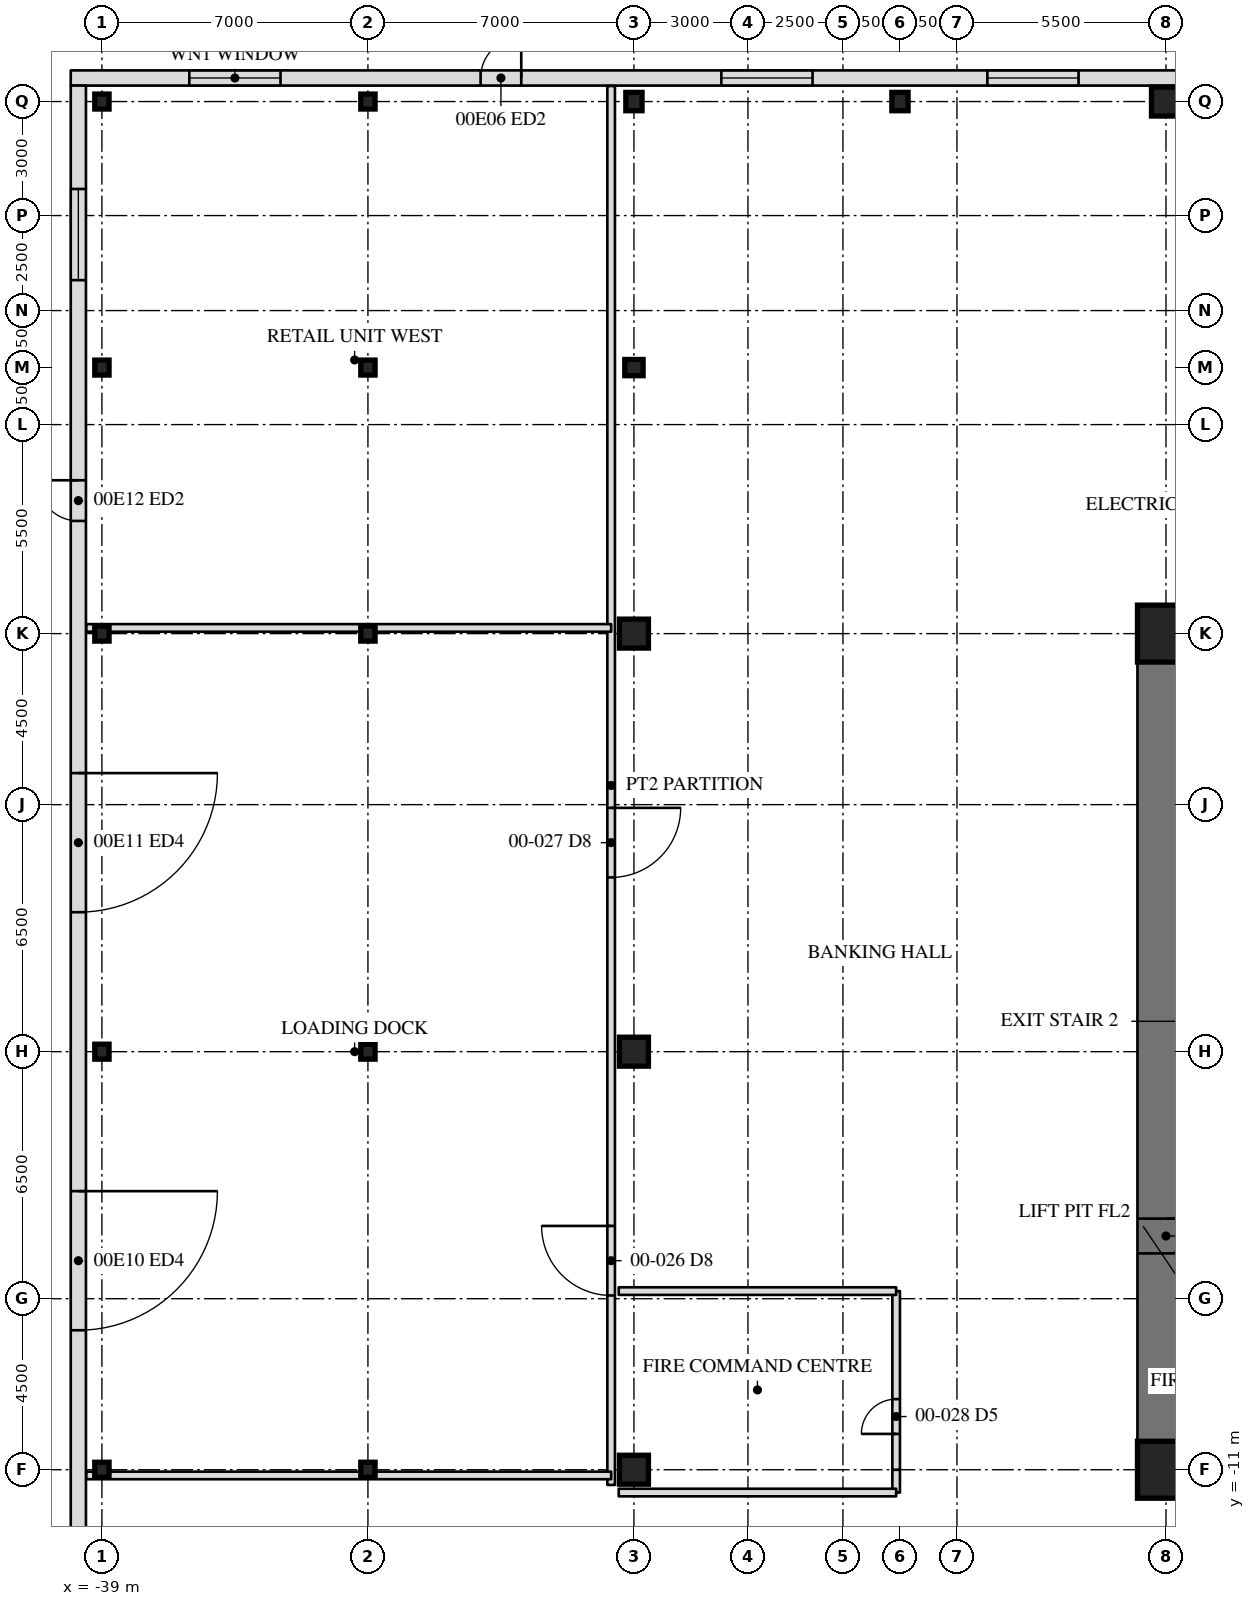
"""IFC4 building model, lengths in metres.
Left out: names, types, materials, properties, quantities, classifications, styles, units other than length and angle.
Written with IfcOpenShell. Run it as: python <this file> out.ifc"""

import sys

from ifc_helpers import new_model, si_unit, direction, frame, frame_2d, origin, origin_2d, place, context, subcontext, project, spatial, rectangle, hollow_rectangle, i_section, extrude, element, fill, save


model = new_model("IFC4")
c1 = context("Model", 3, precision=1e-05, world=origin(), true_north=direction((0.0, 1.0)))
c2 = subcontext(c1, "Body", "Model", "MODEL_VIEW")
j1 = project(units=[si_unit("LENGTHUNIT", "METRE"), si_unit("PLANEANGLEUNIT", "RADIAN")], contexts=[c1])
p1 = place(None, origin())
s1 = spatial("IfcSite", under=j1, at=p1, CompositionType="ELEMENT")
p2 = place(p1, origin())
s2 = spatial("IfcBuilding", under=s1, at=p2, CompositionType="ELEMENT")
p3 = place(p2, origin())
s3 = spatial("IfcBuildingStorey", under=s2, at=p3, CompositionType="ELEMENT", Elevation=0.0)
for number, where, z_axis, x_axis in (
    (1, (-25.0, 0.0, -0.3), (0.0, 0.0, 1.0), (0.0, 1.0, 0.0)),
    (2, (-25.0, -11.0, -0.3), (0.0, 0.0, 1.0), (0.0, 1.0, 0.0)),
    (3, (-11.0, 25.0, -0.3), (0.0, 0.0, 1.0), (1.0, 0.0, 0.0)),
):
    element("IfcColumn", number, at=place(p3, frame(where, z_axis=z_axis, x_axis=x_axis)), inside=s3, PredefinedType="COLUMN", context=c2, shape_type="SweptSolid", body=[
        extrude(hollow_rectangle(XDim=0.762, YDim=0.762, WallThickness=0.152, at=origin_2d()), origin(), (0.0, 0.0, 1.0), 6.3),
    ])
for number, where, z_axis, x_axis in (
    (4, (-18.0, 25.0, -0.3), (0.0, 0.0, 1.0), (1.0, 0.0, 0.0)),
    (5, (-25.0, 25.0, -0.3), (0.0, 0.0, 1.0), (1.0, 0.0, 0.0)),
    (6, (-25.0, 18.0, -0.3), (0.0, 0.0, 1.0), (0.0, 1.0, 0.0)),
):
    element("IfcColumn", number, at=place(p3, frame(where, z_axis=z_axis, x_axis=x_axis)), inside=s3, PredefinedType="COLUMN", context=c2, shape_type="SweptSolid", body=[
        extrude(i_section(OverallWidth=0.427, OverallDepth=0.483, WebThickness=0.051, FlangeThickness=0.082, at=origin_2d()), origin(), (0.0, 0.0, 1.0), 6.3),
    ])
p4 = place(p3, frame((-25.0, 11.0, -0.3), z_axis=(0.0, 0.0, 1.0), x_axis=(0.0, 1.0, 0.0)))
e7 = element("IfcColumn", 7, at=p4, inside=s3, PredefinedType="COLUMN", context=c2, shape_type="SweptSolid", body=[
    extrude(hollow_rectangle(XDim=0.762, YDim=0.762, WallThickness=0.152, at=origin_2d()), origin(), (0.0, 0.0, 1.0), 6.3),
])
for number, where, z_axis, x_axis in (
    (8, (-39.0, -11.0, -0.3), (0.0, 0.0, 1.0), (0.0, 1.0, 0.0)),
    (9, (-39.0, 0.0, -0.3), (0.0, 0.0, 1.0), (0.0, 1.0, 0.0)),
    (10, (-39.0, 11.0, -0.3), (0.0, 0.0, 1.0), (0.0, 1.0, 0.0)),
    (11, (-39.0, 18.0, -0.3), (0.0, 0.0, 1.0), (0.0, 1.0, 0.0)),
    (12, (-39.0, 25.0, -0.3), (0.0, 0.0, 1.0), (0.0, 1.0, 0.0)),
    (13, (-32.0, -11.0, -0.3), (0.0, 0.0, 1.0), (0.0, 1.0, 0.0)),
    (14, (-32.0, 0.0, -0.3), (0.0, 0.0, 1.0), (0.0, 1.0, 0.0)),
    (15, (-32.0, 11.0, -0.3), (0.0, 0.0, 1.0), (0.0, 1.0, 0.0)),
    (16, (-32.0, 18.0, -0.3), (0.0, 0.0, 1.0), (0.0, 1.0, 0.0)),
    (17, (-32.0, 25.0, -0.3), (0.0, 0.0, 1.0), (0.0, 1.0, 0.0)),
):
    element("IfcColumn", number, at=place(p3, frame(where, z_axis=z_axis, x_axis=x_axis)), inside=s3, PredefinedType="COLUMN", context=c2, shape_type="SweptSolid", body=[
        extrude(i_section(OverallWidth=0.394, OverallDepth=0.376, WebThickness=0.017, FlangeThickness=0.028, at=origin_2d()), origin(), (0.0, 0.0, 1.0), 6.3),
    ])
p5 = place(p3, frame((-11.0, 11.0, -0.3), z_axis=(0.0, 0.0, 1.0), x_axis=(0.0, -1.0, 0.0)))
e18 = element("IfcWall", 18, at=p5, inside=s3, PredefinedType="SHEAR", context=c2, shape_type="SweptSolid", body=[
    extrude(rectangle(XDim=22.0, YDim=1.5, at=frame_2d((11.0, 0.0))), origin(), (0.0, 0.0, 1.0), 6.3),
])
p6 = place(p5, frame((15.393, 0.0, 0.3)))
e19 = element("IfcOpeningElement", 19, at=p6, cuts=e18, PredefinedType="OPENING", context=c2, shape_type="SweptSolid", body=[
    extrude(rectangle(XDim=0.915, YDim=2.134, at=frame_2d((0.458, 1.067))), frame((0.0, 0.76, 0.0), z_axis=(0.0, -1.0, 0.0), x_axis=(1.0, 0.0, 0.0)), (0.0, 0.0, 1.0), 1.52),
])
for number, where, z_axis, x_axis in (
    (20, (-6.5, 11.0, -0.3), (0.0, 0.0, 1.0), (-1.0, 0.0, 0.0)),
    (21, (-11.0, -11.0, -0.3), (0.0, 0.0, 1.0), (1.0, 0.0, 0.0)),
):
    element("IfcWall", number, at=place(p3, frame(where, z_axis=z_axis, x_axis=x_axis)), inside=s3, PredefinedType="SHEAR", context=c2, shape_type="SweptSolid", body=[
        extrude(rectangle(XDim=4.5, YDim=1.5, at=frame_2d((2.25, 0.0))), origin(), (0.0, 0.0, 1.0), 6.3),
    ])
for number, where, z_axis, x_axis in (
    (22, (-11.0, 11.0, -0.3), (0.0, 0.0, 1.0), (1.0, 0.0, 0.0)),
    (23, (-11.0, -11.0, -0.3), (0.0, 0.0, 1.0), (1.0, 0.0, 0.0)),
):
    element("IfcColumn", number, at=place(p3, frame(where, z_axis=z_axis, x_axis=x_axis)), inside=s3, PredefinedType="COLUMN", context=c2, shape_type="SweptSolid", body=[
        extrude(hollow_rectangle(XDim=1.499, YDim=1.499, WallThickness=0.102, at=origin_2d()), origin(), (0.0, 0.0, 1.0), 6.3),
    ])
p7 = place(p3, frame((39.82, 25.62, -0.3), z_axis=(0.0, 0.0, 1.0), x_axis=(-1.0, 0.0, 0.0)))
e24 = element("IfcWall", 24, at=p7, inside=s3, PredefinedType="SOLIDWALL", context=c2, shape_type="SweptSolid", body=[
    extrude(rectangle(XDim=79.64, YDim=0.4, at=frame_2d((39.82, 0.0))), origin(), (0.0, 0.0, 1.0), 6.11),
])
p8 = place(p7, frame((74.12, 0.0, 1.2)))
e25 = element("IfcOpeningElement", 25, at=p8, cuts=e24, PredefinedType="OPENING", context=c2, shape_type="SweptSolid", body=[
    extrude(rectangle(XDim=2.4, YDim=4.2, at=frame_2d((1.2, 2.1))), frame((0.0, 0.21, 0.0), z_axis=(0.0, -1.0, 0.0), x_axis=(1.0, 0.0, 0.0)), (0.0, 0.0, 1.0), 0.42),
])
p9 = place(p7, frame((67.785, 0.0, 0.3)))
e26 = element("IfcOpeningElement", 26, at=p9, cuts=e24, PredefinedType="OPENING", context=c2, shape_type="SweptSolid", body=[
    extrude(rectangle(XDim=1.07, YDim=2.44, at=frame_2d((0.535, 1.22))), frame((0.0, 0.21, 0.0), z_axis=(0.0, -1.0, 0.0), x_axis=(1.0, 0.0, 0.0)), (0.0, 0.0, 1.0), 0.42),
])
p10 = place(p7, frame((60.12, 0.0, 1.2)))
e27 = element("IfcOpeningElement", 27, at=p10, cuts=e24, PredefinedType="OPENING", context=c2, shape_type="SweptSolid", body=[
    extrude(rectangle(XDim=2.4, YDim=4.2, at=frame_2d((1.2, 2.1))), frame((0.0, 0.21, 0.0), z_axis=(0.0, -1.0, 0.0), x_axis=(1.0, 0.0, 0.0)), (0.0, 0.0, 1.0), 0.42),
])
p11 = place(p7, frame((53.12, 0.0, 1.2)))
e28 = element("IfcOpeningElement", 28, at=p11, cuts=e24, PredefinedType="OPENING", context=c2, shape_type="SweptSolid", body=[
    extrude(rectangle(XDim=2.4, YDim=4.2, at=frame_2d((1.2, 2.1))), frame((0.0, 0.21, 0.0), z_axis=(0.0, -1.0, 0.0), x_axis=(1.0, 0.0, 0.0)), (0.0, 0.0, 1.0), 0.42),
])
p12 = place(p7, frame((44.405, 0.0, 0.3)))
e29 = element("IfcOpeningElement", 29, at=p12, cuts=e24, PredefinedType="OPENING", context=c2, shape_type="SweptSolid", body=[
    extrude(rectangle(XDim=1.83, YDim=2.44, at=frame_2d((0.915, 1.22))), frame((0.0, 0.21, 0.0), z_axis=(0.0, -1.0, 0.0), x_axis=(1.0, 0.0, 0.0)), (0.0, 0.0, 1.0), 0.42),
])
p13 = place(p7, frame((33.405, 0.0, 0.3)))
e30 = element("IfcOpeningElement", 30, at=p13, cuts=e24, PredefinedType="OPENING", context=c2, shape_type="SweptSolid", body=[
    extrude(rectangle(XDim=1.83, YDim=2.44, at=frame_2d((0.915, 1.22))), frame((0.0, 0.21, 0.0), z_axis=(0.0, -1.0, 0.0), x_axis=(1.0, 0.0, 0.0)), (0.0, 0.0, 1.0), 0.42),
])
p14 = place(p7, frame((24.12, 0.0, 1.2)))
e31 = element("IfcOpeningElement", 31, at=p14, cuts=e24, PredefinedType="OPENING", context=c2, shape_type="SweptSolid", body=[
    extrude(rectangle(XDim=2.4, YDim=4.2, at=frame_2d((1.2, 2.1))), frame((0.0, 0.21, 0.0), z_axis=(0.0, -1.0, 0.0), x_axis=(1.0, 0.0, 0.0)), (0.0, 0.0, 1.0), 0.42),
])
p15 = place(p7, frame((17.12, 0.0, 1.2)))
e32 = element("IfcOpeningElement", 32, at=p15, cuts=e24, PredefinedType="OPENING", context=c2, shape_type="SweptSolid", body=[
    extrude(rectangle(XDim=2.4, YDim=4.2, at=frame_2d((1.2, 2.1))), frame((0.0, 0.21, 0.0), z_axis=(0.0, -1.0, 0.0), x_axis=(1.0, 0.0, 0.0)), (0.0, 0.0, 1.0), 0.42),
])
p16 = place(p7, frame((3.12, 0.0, 1.2)))
e33 = element("IfcOpeningElement", 33, at=p16, cuts=e24, PredefinedType="OPENING", context=c2, shape_type="SweptSolid", body=[
    extrude(rectangle(XDim=2.4, YDim=4.2, at=frame_2d((1.2, 2.1))), frame((0.0, 0.21, 0.0), z_axis=(0.0, -1.0, 0.0), x_axis=(1.0, 0.0, 0.0)), (0.0, 0.0, 1.0), 0.42),
])
p17 = place(p7, frame((10.785, 0.0, 0.3)))
e34 = element("IfcOpeningElement", 34, at=p17, cuts=e24, PredefinedType="OPENING", context=c2, shape_type="SweptSolid", body=[
    extrude(rectangle(XDim=1.07, YDim=2.13, at=frame_2d((0.535, 1.065))), frame((0.0, 0.21, 0.0), z_axis=(0.0, -1.0, 0.0), x_axis=(1.0, 0.0, 0.0)), (0.0, 0.0, 1.0), 0.42),
])
p18 = place(p3, frame((-39.62, 25.42, -0.3), z_axis=(0.0, 0.0, 1.0), x_axis=(0.0, -1.0, 0.0)))
e35 = element("IfcWall", 35, at=p18, inside=s3, PredefinedType="SOLIDWALL", context=c2, shape_type="SweptSolid", body=[
    extrude(rectangle(XDim=50.84, YDim=0.4, at=frame_2d((25.42, 0.0))), origin(), (0.0, 0.0, 1.0), 6.11),
])
p19 = place(p18, frame((45.72, 0.0, 1.2)))
e36 = element("IfcOpeningElement", 36, at=p19, cuts=e35, PredefinedType="OPENING", context=c2, shape_type="SweptSolid", body=[
    extrude(rectangle(XDim=2.4, YDim=4.2, at=frame_2d((1.2, 2.1))), frame((0.0, 0.21, 0.0), z_axis=(0.0, -1.0, 0.0), x_axis=(1.0, 0.0, 0.0)), (0.0, 0.0, 1.0), 0.42),
])
p20 = place(p18, frame((39.385, 0.0, 0.3)))
e37 = element("IfcOpeningElement", 37, at=p20, cuts=e35, PredefinedType="OPENING", context=c2, shape_type="SweptSolid", body=[
    extrude(rectangle(XDim=1.07, YDim=2.13, at=frame_2d((0.535, 1.065))), frame((0.0, 0.21, 0.0), z_axis=(0.0, -1.0, 0.0), x_axis=(1.0, 0.0, 0.0)), (0.0, 0.0, 1.0), 0.42),
])
p21 = place(p18, frame((29.09, 0.0, 0.3)))
e38 = element("IfcOpeningElement", 38, at=p21, cuts=e35, PredefinedType="OPENING", context=c2, shape_type="SweptSolid", body=[
    extrude(rectangle(XDim=3.66, YDim=4.27, at=frame_2d((1.83, 2.135))), frame((0.0, 0.21, 0.0), z_axis=(0.0, -1.0, 0.0), x_axis=(1.0, 0.0, 0.0)), (0.0, 0.0, 1.0), 0.42),
])
p22 = place(p18, frame((18.09, 0.0, 0.3)))
e39 = element("IfcOpeningElement", 39, at=p22, cuts=e35, PredefinedType="OPENING", context=c2, shape_type="SweptSolid", body=[
    extrude(rectangle(XDim=3.66, YDim=4.27, at=frame_2d((1.83, 2.135))), frame((0.0, 0.21, 0.0), z_axis=(0.0, -1.0, 0.0), x_axis=(1.0, 0.0, 0.0)), (0.0, 0.0, 1.0), 0.42),
])
p23 = place(p18, frame((10.385, 0.0, 0.3)))
e40 = element("IfcOpeningElement", 40, at=p23, cuts=e35, PredefinedType="OPENING", context=c2, shape_type="SweptSolid", body=[
    extrude(rectangle(XDim=1.07, YDim=2.44, at=frame_2d((0.535, 1.22))), frame((0.0, 0.21, 0.0), z_axis=(0.0, -1.0, 0.0), x_axis=(1.0, 0.0, 0.0)), (0.0, 0.0, 1.0), 0.42),
])
p24 = place(p18, frame((2.72, 0.0, 1.2)))
e41 = element("IfcOpeningElement", 41, at=p24, cuts=e35, PredefinedType="OPENING", context=c2, shape_type="SweptSolid", body=[
    extrude(rectangle(XDim=2.4, YDim=4.2, at=frame_2d((1.2, 2.1))), frame((0.0, 0.21, 0.0), z_axis=(0.0, -1.0, 0.0), x_axis=(1.0, 0.0, 0.0)), (0.0, 0.0, 1.0), 0.42),
])
p25 = place(p3, frame((-25.6, 25.41, 0.0), z_axis=(0.0, 0.0, 1.0), x_axis=(0.0, -1.0, 0.0)))
e42 = element("IfcWall", 42, at=p25, inside=s3, PredefinedType="PARTITIONING", context=c2, shape_type="SweptSolid", body=[
    extrude(rectangle(XDim=36.81, YDim=0.2, at=frame_2d((18.405, 0.0))), origin(), (0.0, 0.0, 1.0), 5.81),
])
p26 = place(p25, frame((29.995, 0.0, 0.3)))
e43 = element("IfcOpeningElement", 43, at=p26, cuts=e42, PredefinedType="OPENING", context=c2, shape_type="SweptSolid", body=[
    extrude(rectangle(XDim=1.83, YDim=2.134, at=frame_2d((0.915, 1.067))), frame((0.0, 0.11, 0.0), z_axis=(0.0, -1.0, 0.0), x_axis=(1.0, 0.0, 0.0)), (0.0, 0.0, 1.0), 0.22),
])
p27 = place(p25, frame((18.995, 0.0, 0.3)))
e44 = element("IfcOpeningElement", 44, at=p27, cuts=e42, PredefinedType="OPENING", context=c2, shape_type="SweptSolid", body=[
    extrude(rectangle(XDim=1.83, YDim=2.134, at=frame_2d((0.915, 1.067))), frame((0.0, 0.11, 0.0), z_axis=(0.0, -1.0, 0.0), x_axis=(1.0, 0.0, 0.0)), (0.0, 0.0, 1.0), 0.22),
])
p28 = place(p3, frame((-18.1, -11.6, 0.0), z_axis=(0.0, 0.0, 1.0), x_axis=(0.0, 1.0, 0.0)))
e45 = element("IfcWall", 45, at=p28, inside=s3, PredefinedType="PARTITIONING", context=c2, shape_type="SweptSolid", body=[
    extrude(rectangle(XDim=0.6, YDim=0.2, at=frame_2d((0.3, 0.0))), origin(), (0.0, 0.0, 1.0), 5.183),
])
p29 = place(p3, frame((-18.1, -11.0, 0.0), z_axis=(0.0, 0.0, 1.0), x_axis=(0.0, 1.0, 0.0)))
e46 = element("IfcWall", 46, at=p29, inside=s3, PredefinedType="PARTITIONING", context=c2, shape_type="SweptSolid", body=[
    extrude(rectangle(XDim=4.7, YDim=0.2, at=frame_2d((2.35, 0.0))), origin(), (0.0, 0.0, 1.0), 5.81),
])
p30 = place(p29, frame((0.942, 0.0, 0.3)))
e47 = element("IfcOpeningElement", 47, at=p30, cuts=e46, PredefinedType="OPENING", context=c2, shape_type="SweptSolid", body=[
    extrude(rectangle(XDim=0.915, YDim=2.134, at=frame_2d((0.458, 1.067))), frame((0.0, 0.11, 0.0), z_axis=(0.0, -1.0, 0.0), x_axis=(1.0, 0.0, 0.0)), (0.0, 0.0, 1.0), 0.22),
])
for number, where, z_axis, x_axis in (
    (48, (-18.1, -6.3, 0.0), (0.0, 0.0, 1.0), (-1.0, 0.0, 0.0)),
    (49, (-25.4, -11.6, 0.0), (0.0, 0.0, 1.0), (1.0, 0.0, 0.0)),
):
    element("IfcWall", number, at=place(p3, frame(where, z_axis=z_axis, x_axis=x_axis)), inside=s3, PredefinedType="PARTITIONING", context=c2, shape_type="SweptSolid", body=[
        extrude(rectangle(XDim=7.3, YDim=0.2, at=frame_2d((3.65, 0.0))), origin(), (0.0, 0.0, 1.0), 5.81),
    ])
for number, where, z_axis, x_axis in (
    (50, (-25.6, 11.15, 0.0), (0.0, 0.0, 1.0), (-1.0, 0.0, 0.0)),
    (51, (-25.6, -11.15, 0.0), (0.0, 0.0, 1.0), (-1.0, 0.0, 0.0)),
):
    element("IfcWall", number, at=place(p3, frame(where, z_axis=z_axis, x_axis=x_axis)), inside=s3, PredefinedType="PARTITIONING", context=c2, shape_type="SweptSolid", body=[
        extrude(rectangle(XDim=13.81, YDim=0.2, at=frame_2d((6.905, 0.0))), origin(), (0.0, 0.0, 1.0), 5.198),
    ])
p31 = place(p8, origin())
e52 = element("IfcWindow", 52, at=p31, inside=s3, PartitioningType="SINGLE_PANEL", PredefinedType="WINDOW", context=c2, shape_type="SweptSolid", body=[
    extrude(rectangle(XDim=2.4, YDim=4.2, at=frame_2d((1.2, 2.1))), frame((0.0, 0.03, 0.0), z_axis=(0.0, -1.0, 0.0), x_axis=(1.0, 0.0, 0.0)), (0.0, 0.0, 1.0), 0.06),
])
fill(e25, e52)
p32 = place(p9, frame((1.07, 0.0, 0.0), z_axis=(0.0, 0.0, 1.0), x_axis=(-1.0, 0.0, 0.0)))
e53 = element("IfcDoor", 53, at=p32, inside=s3, OperationType="SINGLE_SWING_LEFT", PredefinedType="DOOR", context=c2, shape_type="SweptSolid", body=[
    extrude(rectangle(XDim=1.07, YDim=2.44, at=frame_2d((0.535, 1.22))), frame((0.0, 0.025, 0.0), z_axis=(0.0, -1.0, 0.0), x_axis=(1.0, 0.0, 0.0)), (0.0, 0.0, 1.0), 0.05),
])
fill(e26, e53)
p33 = place(p10, origin())
e54 = element("IfcWindow", 54, at=p33, inside=s3, PartitioningType="SINGLE_PANEL", PredefinedType="WINDOW", context=c2, shape_type="SweptSolid", body=[
    extrude(rectangle(XDim=2.4, YDim=4.2, at=frame_2d((1.2, 2.1))), frame((0.0, 0.03, 0.0), z_axis=(0.0, -1.0, 0.0), x_axis=(1.0, 0.0, 0.0)), (0.0, 0.0, 1.0), 0.06),
])
fill(e27, e54)
p34 = place(p11, origin())
e55 = element("IfcWindow", 55, at=p34, inside=s3, PartitioningType="SINGLE_PANEL", PredefinedType="WINDOW", context=c2, shape_type="SweptSolid", body=[
    extrude(rectangle(XDim=2.4, YDim=4.2, at=frame_2d((1.2, 2.1))), frame((0.0, 0.03, 0.0), z_axis=(0.0, -1.0, 0.0), x_axis=(1.0, 0.0, 0.0)), (0.0, 0.0, 1.0), 0.06),
])
fill(e28, e55)
p35 = place(p21, origin())
e56 = element("IfcDoor", 56, at=p35, inside=s3, OperationType="SINGLE_SWING_LEFT", PredefinedType="DOOR", context=c2, shape_type="SweptSolid", body=[
    extrude(rectangle(XDim=3.66, YDim=4.27, at=frame_2d((1.83, 2.135))), frame((0.0, 0.025, 0.0), z_axis=(0.0, -1.0, 0.0), x_axis=(1.0, 0.0, 0.0)), (0.0, 0.0, 1.0), 0.05),
])
fill(e38, e56)
p36 = place(p22, origin())
e57 = element("IfcDoor", 57, at=p36, inside=s3, OperationType="SINGLE_SWING_LEFT", PredefinedType="DOOR", context=c2, shape_type="SweptSolid", body=[
    extrude(rectangle(XDim=3.66, YDim=4.27, at=frame_2d((1.83, 2.135))), frame((0.0, 0.025, 0.0), z_axis=(0.0, -1.0, 0.0), x_axis=(1.0, 0.0, 0.0)), (0.0, 0.0, 1.0), 0.05),
])
fill(e39, e57)
p37 = place(p23, frame((1.07, 0.0, 0.0), z_axis=(0.0, 0.0, 1.0), x_axis=(-1.0, 0.0, 0.0)))
e58 = element("IfcDoor", 58, at=p37, inside=s3, OperationType="SINGLE_SWING_LEFT", PredefinedType="DOOR", context=c2, shape_type="SweptSolid", body=[
    extrude(rectangle(XDim=1.07, YDim=2.44, at=frame_2d((0.535, 1.22))), frame((0.0, 0.025, 0.0), z_axis=(0.0, -1.0, 0.0), x_axis=(1.0, 0.0, 0.0)), (0.0, 0.0, 1.0), 0.05),
])
fill(e40, e58)
p38 = place(p24, origin())
e59 = element("IfcWindow", 59, at=p38, inside=s3, PartitioningType="SINGLE_PANEL", PredefinedType="WINDOW", context=c2, shape_type="SweptSolid", body=[
    extrude(rectangle(XDim=2.4, YDim=4.2, at=frame_2d((1.2, 2.1))), frame((0.0, 0.03, 0.0), z_axis=(0.0, -1.0, 0.0), x_axis=(1.0, 0.0, 0.0)), (0.0, 0.0, 1.0), 0.06),
])
fill(e41, e59)
p39 = place(p6, origin())
e60 = element("IfcDoor", 60, at=p39, inside=s3, OperationType="SINGLE_SWING_RIGHT", PredefinedType="DOOR", context=c2, shape_type="SweptSolid", body=[
    extrude(rectangle(XDim=0.915, YDim=2.134, at=frame_2d((0.458, 1.067))), frame((0.0, -0.675, 0.0), z_axis=(0.0, -1.0, 0.0), x_axis=(1.0, 0.0, 0.0)), (0.0, 0.0, 1.0), 0.05),
])
fill(e19, e60)
p40 = place(p26, frame((1.83, 0.0, 0.0), z_axis=(0.0, 0.0, 1.0), x_axis=(-1.0, 0.0, 0.0)))
e61 = element("IfcDoor", 61, at=p40, inside=s3, OperationType="DOUBLE_DOOR_DOUBLE_SWING", PredefinedType="DOOR", context=c2, shape_type="SweptSolid", body=[
    extrude(rectangle(XDim=1.83, YDim=2.134, at=frame_2d((0.915, 1.067))), frame((0.0, 0.025, 0.0), z_axis=(0.0, -1.0, 0.0), x_axis=(1.0, 0.0, 0.0)), (0.0, 0.0, 1.0), 0.05),
])
fill(e43, e61)
p41 = place(p27, origin())
e62 = element("IfcDoor", 62, at=p41, inside=s3, OperationType="DOUBLE_DOOR_DOUBLE_SWING", PredefinedType="DOOR", context=c2, shape_type="SweptSolid", body=[
    extrude(rectangle(XDim=1.83, YDim=2.134, at=frame_2d((0.915, 1.067))), frame((0.0, 0.025, 0.0), z_axis=(0.0, -1.0, 0.0), x_axis=(1.0, 0.0, 0.0)), (0.0, 0.0, 1.0), 0.05),
])
fill(e44, e62)
p42 = place(p30, origin())
e63 = element("IfcDoor", 63, at=p42, inside=s3, OperationType="SINGLE_SWING_RIGHT", PredefinedType="DOOR", context=c2, shape_type="SweptSolid", body=[
    extrude(rectangle(XDim=0.915, YDim=2.134, at=frame_2d((0.458, 1.067))), frame((0.0, 0.025, 0.0), z_axis=(0.0, -1.0, 0.0), x_axis=(1.0, 0.0, 0.0)), (0.0, 0.0, 1.0), 0.05),
])
fill(e47, e63)
save(model, sys.argv[1])
